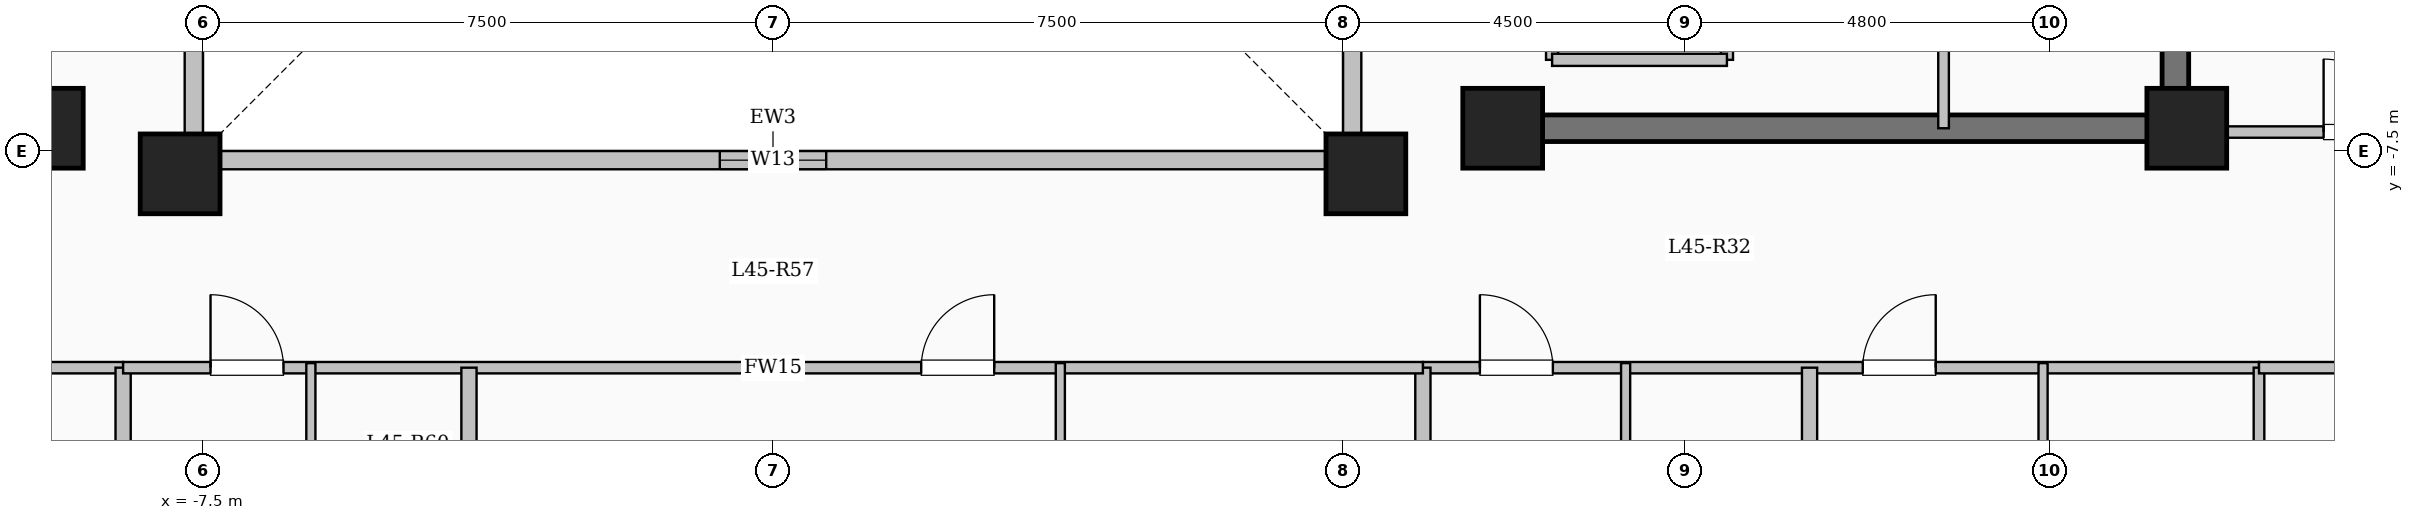
"""IFC4 building model, lengths in metres.
Left out: names, types, materials, properties, quantities, classifications, styles, units other than length and angle.
Written with IfcOpenShell. Run it as: python <this file> out.ifc"""

import sys

from ifc_helpers import new_model, si_unit, direction, frame, frame_2d, origin, origin_2d, place, context, subcontext, project, spatial, rectangle, extrude, element, fill, save


model = new_model("IFC4")
c1 = context("Model", 3, precision=1e-05, world=origin(), true_north=direction((0.0, 1.0)))
c2 = subcontext(c1, "Body", "Model", "MODEL_VIEW")
j1 = project(units=[si_unit("LENGTHUNIT", "METRE"), si_unit("PLANEANGLEUNIT", "RADIAN")], contexts=[c1])
p1 = place(None, origin())
s1 = spatial("IfcSite", under=j1, at=p1, CompositionType="ELEMENT")
p2 = place(p1, origin())
s2 = spatial("IfcBuilding", under=s1, at=p2, CompositionType="ELEMENT")
p3 = place(p2, frame((0.0, 0.0, 166.1)))
s3 = spatial("IfcBuildingStorey", under=s2, at=p3, CompositionType="ELEMENT", Elevation=166.1)
for number, where, z_axis, x_axis in (
    (1, (-7.8, -7.8, 0.0), (0.0, 0.0, 1.0), (1.0, 0.0, 0.0)),
    (2, (7.8, -7.8, 0.0), (0.0, 0.0, 1.0), (1.0, 0.0, 0.0)),
    (3, (-9.6, -7.2, 0.0), (0.0, 0.0, 1.0), (1.0, 0.0, 0.0)),
    (4, (9.6, -7.2, 0.0), (0.0, 0.0, 1.0), (1.0, 0.0, 0.0)),
    (5, (18.6, -7.2, 0.0), (0.0, 0.0, 1.0), (1.0, 0.0, 0.0)),
):
    element("IfcColumn", number, at=place(p3, frame(where, z_axis=z_axis, x_axis=x_axis)), inside=s3, PredefinedType="COLUMN", context=c2, shape_type="SweptSolid", body=[
        extrude(rectangle(XDim=1.05, YDim=1.05, at=origin_2d()), origin(), (0.0, 0.0, 1.0), 3.35),
    ])
p4 = place(p3, frame((-7.62, -7.62, 0.0), z_axis=(0.0, 0.0, 1.0), x_axis=(1.0, 0.0, 0.0)))
e6 = element("IfcWall", 6, at=p4, inside=s3, PredefinedType="SOLIDWALL", context=c2, shape_type="SweptSolid", body=[
    extrude(rectangle(XDim=15.24, YDim=0.24, at=frame_2d((7.62, 0.0))), origin(), (0.0, 0.0, 1.0), 3.1),
])
p5 = place(p4, frame((6.92, 0.0, 0.95)))
e7 = element("IfcOpeningElement", 7, at=p5, cuts=e6, PredefinedType="OPENING", context=c2, shape_type="SweptSolid", body=[
    extrude(rectangle(XDim=1.4, YDim=1.5, at=frame_2d((0.7, 0.75))), frame((0.0, 0.13, 0.0), z_axis=(0.0, -1.0, 0.0), x_axis=(1.0, 0.0, 0.0)), (0.0, 0.0, 1.0), 0.26),
])
p6 = place(p3, frame((7.62, -7.62, 0.0), z_axis=(0.0, 0.0, 1.0), x_axis=(0.0, 1.0, 0.0)))
e8 = element("IfcWall", 8, at=p6, inside=s3, PredefinedType="SOLIDWALL", context=c2, shape_type="SweptSolid", body=[
    extrude(rectangle(XDim=15.24, YDim=0.24, at=frame_2d((7.62, 0.0))), origin(), (0.0, 0.0, 1.0), 3.1),
])
p7 = place(p6, frame((6.92, 0.0, 0.95)))
e9 = element("IfcOpeningElement", 9, at=p7, cuts=e8, PredefinedType="OPENING", context=c2, shape_type="SweptSolid", body=[
    extrude(rectangle(XDim=1.4, YDim=1.5, at=frame_2d((0.7, 0.75))), frame((0.0, 0.13, 0.0), z_axis=(0.0, -1.0, 0.0), x_axis=(1.0, 0.0, 0.0)), (0.0, 0.0, 1.0), 0.26),
])
p8 = place(p3, frame((-7.62, 7.62, 0.0), z_axis=(0.0, 0.0, 1.0), x_axis=(0.0, -1.0, 0.0)))
e10 = element("IfcWall", 10, at=p8, inside=s3, PredefinedType="SOLIDWALL", context=c2, shape_type="SweptSolid", body=[
    extrude(rectangle(XDim=15.24, YDim=0.24, at=frame_2d((7.62, 0.0))), origin(), (0.0, 0.0, 1.0), 3.1),
])
p9 = place(p8, frame((6.92, 0.0, 0.95)))
e11 = element("IfcOpeningElement", 11, at=p9, cuts=e10, PredefinedType="OPENING", context=c2, shape_type="SweptSolid", body=[
    extrude(rectangle(XDim=1.4, YDim=1.5, at=frame_2d((0.7, 0.75))), frame((0.0, 0.13, 0.0), z_axis=(0.0, -1.0, 0.0), x_axis=(1.0, 0.0, 0.0)), (0.0, 0.0, 1.0), 0.26),
])
p10 = place(p3, frame((10.25, -6.3, 0.0), z_axis=(0.0, 0.0, 1.0), x_axis=(0.0, 1.0, 0.0)))
e12 = element("IfcWall", 12, at=p10, inside=s3, PredefinedType="SOLIDWALL", context=c2, shape_type="SweptSolid", body=[
    extrude(rectangle(XDim=2.6, YDim=0.16, at=frame_2d((1.3, 0.0))), origin(), (0.0, 0.0, 1.0), 3.1),
])
p11 = place(p10, frame((0.75, 0.0, 0.0)))
e13 = element("IfcOpeningElement", 13, at=p11, cuts=e12, PredefinedType="OPENING", context=c2, shape_type="SweptSolid", body=[
    extrude(rectangle(XDim=1.1, YDim=2.15, at=frame_2d((0.55, 1.075))), frame((0.0, 0.09, 0.0), z_axis=(0.0, -1.0, 0.0), x_axis=(1.0, 0.0, 0.0)), (0.0, 0.0, 1.0), 0.18),
])
p12 = place(p3, frame((12.55, -6.3, 0.0), z_axis=(0.0, 0.0, 1.0), x_axis=(0.0, 1.0, 0.0)))
e14 = element("IfcWall", 14, at=p12, inside=s3, PredefinedType="SOLIDWALL", context=c2, shape_type="SweptSolid", body=[
    extrude(rectangle(XDim=2.6, YDim=0.16, at=frame_2d((1.3, 0.0))), origin(), (0.0, 0.0, 1.0), 3.1),
])
p13 = place(p3, frame((10.25, -6.3, 0.0), z_axis=(0.0, 0.0, 1.0), x_axis=(1.0, 0.0, 0.0)))
e15 = element("IfcWall", 15, at=p13, inside=s3, PredefinedType="SOLIDWALL", context=c2, shape_type="SweptSolid", body=[
    extrude(rectangle(XDim=2.3, YDim=0.16, at=frame_2d((1.15, 0.0))), origin(), (0.0, 0.0, 1.0), 3.1),
])
p14 = place(p3, frame((18.45, -7.375, 0.0), z_axis=(0.0, 0.0, 1.0), x_axis=(0.0, 1.0, 0.0)))
e16 = element("IfcWall", 16, at=p14, inside=s3, PredefinedType="SHEAR", context=c2, shape_type="SweptSolid", body=[
    extrude(rectangle(XDim=14.05, YDim=0.35, at=frame_2d((7.025, 0.0))), origin(), (0.0, 0.0, 1.0), 3.35),
])
p15 = place(p3, frame((10.075, -7.2, 0.0), z_axis=(0.0, 0.0, 1.0), x_axis=(1.0, 0.0, 0.0)))
e17 = element("IfcWall", 17, at=p15, inside=s3, PredefinedType="SHEAR", context=c2, shape_type="SweptSolid", body=[
    extrude(rectangle(XDim=8.55, YDim=0.35, at=frame_2d((4.275, 0.0))), origin(), (0.0, 0.0, 1.0), 3.35),
])
p16 = place(p3, frame((15.4, -7.2, 0.0), z_axis=(0.0, 0.0, 1.0), x_axis=(0.0, 1.0, 0.0)))
e18 = element("IfcWall", 18, at=p16, inside=s3, PredefinedType="PARTITIONING", context=c2, shape_type="SweptSolid", body=[
    extrude(rectangle(XDim=10.45, YDim=0.14, at=frame_2d((5.225, 0.0))), origin(), (0.0, 0.0, 1.0), 3.1),
])
p17 = place(p16, frame((9.25, 0.0, 0.0)))
e19 = element("IfcOpeningElement", 19, at=p17, cuts=e18, PredefinedType="OPENING", context=c2, shape_type="SweptSolid", body=[
    extrude(rectangle(XDim=0.9, YDim=2.08, at=frame_2d((0.45, 1.04))), frame((0.0, 0.08, 0.0), z_axis=(0.0, -1.0, 0.0), x_axis=(1.0, 0.0, 0.0)), (0.0, 0.0, 1.0), 0.16),
])
p18 = place(p3, frame((-19.55, -10.35, 0.0), z_axis=(0.0, 0.0, 1.0), x_axis=(1.0, 0.0, 0.0)))
e20 = element("IfcWall", 20, at=p18, inside=s3, PredefinedType="PARTITIONING", context=c2, shape_type="SweptSolid", body=[
    extrude(rectangle(XDim=11.0, YDim=0.15, at=frame_2d((5.5, 0.0))), origin(), (0.0, 0.0, 1.0), 3.1),
])
p19 = place(p18, frame((0.7, 0.0, 0.0)))
e21 = element("IfcOpeningElement", 21, at=p19, cuts=e20, PredefinedType="OPENING", context=c2, shape_type="SweptSolid", body=[
    extrude(rectangle(XDim=0.96, YDim=2.15, at=frame_2d((0.48, 1.075))), frame((0.0, 0.085, 0.0), z_axis=(0.0, -1.0, 0.0), x_axis=(1.0, 0.0, 0.0)), (0.0, 0.0, 1.0), 0.17),
])
p20 = place(p18, frame((6.175, 0.0, 0.0)))
e22 = element("IfcOpeningElement", 22, at=p20, cuts=e20, PredefinedType="OPENING", context=c2, shape_type="SweptSolid", body=[
    extrude(rectangle(XDim=0.96, YDim=2.15, at=frame_2d((0.48, 1.075))), frame((0.0, 0.085, 0.0), z_axis=(0.0, -1.0, 0.0), x_axis=(1.0, 0.0, 0.0)), (0.0, 0.0, 1.0), 0.17),
])
p21 = place(p3, frame((8.55, -10.35, 0.0), z_axis=(0.0, 0.0, 1.0), x_axis=(1.0, 0.0, 0.0)))
e23 = element("IfcWall", 23, at=p21, inside=s3, PredefinedType="PARTITIONING", context=c2, shape_type="SweptSolid", body=[
    extrude(rectangle(XDim=11.0, YDim=0.15, at=frame_2d((5.5, 0.0))), origin(), (0.0, 0.0, 1.0), 3.1),
])
p22 = place(p21, frame((0.75, 0.0, 0.0)))
e24 = element("IfcOpeningElement", 24, at=p22, cuts=e23, PredefinedType="OPENING", context=c2, shape_type="SweptSolid", body=[
    extrude(rectangle(XDim=0.96, YDim=2.15, at=frame_2d((0.48, 1.075))), frame((0.0, 0.085, 0.0), z_axis=(0.0, -1.0, 0.0), x_axis=(1.0, 0.0, 0.0)), (0.0, 0.0, 1.0), 0.17),
])
p23 = place(p21, frame((5.787, 0.0, 0.0)))
e25 = element("IfcOpeningElement", 25, at=p23, cuts=e23, PredefinedType="OPENING", context=c2, shape_type="SweptSolid", body=[
    extrude(rectangle(XDim=0.96, YDim=2.15, at=frame_2d((0.48, 1.075))), frame((0.0, 0.085, 0.0), z_axis=(0.0, -1.0, 0.0), x_axis=(1.0, 0.0, 0.0)), (0.0, 0.0, 1.0), 0.17),
])
p24 = place(p3, frame((13.637, -21.2, 0.0), z_axis=(0.0, 0.0, 1.0), x_axis=(0.0, 1.0, 0.0)))
e26 = element("IfcWall", 26, at=p24, inside=s3, PredefinedType="SOLIDWALL", context=c2, shape_type="SweptSolid", body=[
    extrude(rectangle(XDim=10.85, YDim=0.2, at=frame_2d((5.425, 0.0))), origin(), (0.0, 0.0, 1.0), 3.1),
])
p25 = place(p3, frame((11.217, -13.51, 0.0), z_axis=(0.0, 0.0, 1.0), x_axis=(0.0, 1.0, 0.0)))
e27 = element("IfcWall", 27, at=p25, inside=s3, PredefinedType="PARTITIONING", context=c2, shape_type="SweptSolid", body=[
    extrude(rectangle(XDim=3.22, YDim=0.12, at=frame_2d((1.61, 0.0))), origin(), (0.0, 0.0, 1.0), 3.1),
])
p26 = place(p25, frame((1.14, 0.0, 0.0)))
e28 = element("IfcOpeningElement", 28, at=p26, cuts=e27, PredefinedType="OPENING", context=c2, shape_type="SweptSolid", body=[
    extrude(rectangle(XDim=0.88, YDim=2.1, at=frame_2d((0.44, 1.05))), frame((0.0, 0.07, 0.0), z_axis=(0.0, -1.0, 0.0), x_axis=(1.0, 0.0, 0.0)), (0.0, 0.0, 1.0), 0.14),
])
p27 = place(p3, frame((16.709, -13.51, 0.0), z_axis=(0.0, 0.0, 1.0), x_axis=(0.0, 1.0, 0.0)))
e29 = element("IfcWall", 29, at=p27, inside=s3, PredefinedType="PARTITIONING", context=c2, shape_type="SweptSolid", body=[
    extrude(rectangle(XDim=3.22, YDim=0.12, at=frame_2d((1.61, 0.0))), origin(), (0.0, 0.0, 1.0), 3.1),
])
p28 = place(p27, frame((1.14, 0.0, 0.0)))
e30 = element("IfcOpeningElement", 30, at=p28, cuts=e29, PredefinedType="OPENING", context=c2, shape_type="SweptSolid", body=[
    extrude(rectangle(XDim=0.88, YDim=2.1, at=frame_2d((0.44, 1.05))), frame((0.0, 0.07, 0.0), z_axis=(0.0, -1.0, 0.0), x_axis=(1.0, 0.0, 0.0)), (0.0, 0.0, 1.0), 0.14),
])
for number, where, z_axis, x_axis in (
    (31, (-8.55, -21.804, 0.0), (0.0, 0.0, 1.0), (0.0, 1.0, 0.0)),
    (32, (8.55, -21.804, 0.0), (0.0, 0.0, 1.0), (0.0, 1.0, 0.0)),
):
    element("IfcWall", number, at=place(p3, frame(where, z_axis=z_axis, x_axis=x_axis)), inside=s3, PredefinedType="SOLIDWALL", context=c2, shape_type="SweptSolid", body=[
        extrude(rectangle(XDim=11.454, YDim=0.2, at=frame_2d((5.727, 0.0))), origin(), (0.0, 0.0, 1.0), 3.1),
    ])
p29 = place(p3, frame((-8.55, -10.35, 0.0), z_axis=(0.0, 0.0, 1.0), x_axis=(1.0, 0.0, 0.0)))
e33 = element("IfcWall", 33, at=p29, inside=s3, PredefinedType="PARTITIONING", context=c2, shape_type="SweptSolid", body=[
    extrude(rectangle(XDim=17.1, YDim=0.15, at=frame_2d((8.55, 0.0))), origin(), (0.0, 0.0, 1.0), 3.1),
])
p30 = place(p29, frame((1.15, 0.0, 0.0)))
e34 = element("IfcOpeningElement", 34, at=p30, cuts=e33, PredefinedType="OPENING", context=c2, shape_type="SweptSolid", body=[
    extrude(rectangle(XDim=0.96, YDim=2.15, at=frame_2d((0.48, 1.075))), frame((0.0, 0.085, 0.0), z_axis=(0.0, -1.0, 0.0), x_axis=(1.0, 0.0, 0.0)), (0.0, 0.0, 1.0), 0.17),
])
p31 = place(p29, frame((10.5, 0.0, 0.0)))
e35 = element("IfcOpeningElement", 35, at=p31, cuts=e33, PredefinedType="OPENING", context=c2, shape_type="SweptSolid", body=[
    extrude(rectangle(XDim=0.96, YDim=2.15, at=frame_2d((0.48, 1.075))), frame((0.0, 0.085, 0.0), z_axis=(0.0, -1.0, 0.0), x_axis=(1.0, 0.0, 0.0)), (0.0, 0.0, 1.0), 0.17),
])
p32 = place(p3, frame((-4.0, -21.15, 0.0), z_axis=(0.0, 0.0, 1.0), x_axis=(0.0, 1.0, 0.0)))
e36 = element("IfcWall", 36, at=p32, inside=s3, PredefinedType="SOLIDWALL", context=c2, shape_type="SweptSolid", body=[
    extrude(rectangle(XDim=10.8, YDim=0.2, at=frame_2d((5.4, 0.0))), origin(), (0.0, 0.0, 1.0), 3.1),
])
p33 = place(p3, frame((-6.08, -13.51, 0.0), z_axis=(0.0, 0.0, 1.0), x_axis=(0.0, 1.0, 0.0)))
e37 = element("IfcWall", 37, at=p33, inside=s3, PredefinedType="PARTITIONING", context=c2, shape_type="SweptSolid", body=[
    extrude(rectangle(XDim=3.22, YDim=0.12, at=frame_2d((1.61, 0.0))), origin(), (0.0, 0.0, 1.0), 3.1),
])
p34 = place(p33, frame((1.14, 0.0, 0.0)))
e38 = element("IfcOpeningElement", 38, at=p34, cuts=e37, PredefinedType="OPENING", context=c2, shape_type="SweptSolid", body=[
    extrude(rectangle(XDim=0.88, YDim=2.1, at=frame_2d((0.44, 1.05))), frame((0.0, 0.07, 0.0), z_axis=(0.0, -1.0, 0.0), x_axis=(1.0, 0.0, 0.0)), (0.0, 0.0, 1.0), 0.14),
])
p35 = place(p3, frame((3.78, -13.51, 0.0), z_axis=(0.0, 0.0, 1.0), x_axis=(0.0, 1.0, 0.0)))
e39 = element("IfcWall", 39, at=p35, inside=s3, PredefinedType="PARTITIONING", context=c2, shape_type="SweptSolid", body=[
    extrude(rectangle(XDim=3.22, YDim=0.12, at=frame_2d((1.61, 0.0))), origin(), (0.0, 0.0, 1.0), 3.1),
])
p36 = place(p35, frame((1.14, 0.0, 0.0)))
e40 = element("IfcOpeningElement", 40, at=p36, cuts=e39, PredefinedType="OPENING", context=c2, shape_type="SweptSolid", body=[
    extrude(rectangle(XDim=0.88, YDim=2.1, at=frame_2d((0.44, 1.05))), frame((0.0, 0.07, 0.0), z_axis=(0.0, -1.0, 0.0), x_axis=(1.0, 0.0, 0.0)), (0.0, 0.0, 1.0), 0.14),
])
p37 = place(p3, frame((18.45, -7.25, 0.0), z_axis=(0.0, 0.0, 1.0), x_axis=(1.0, 0.0, 0.0)))
e41 = element("IfcWall", 41, at=p37, inside=s3, PredefinedType="PARTITIONING", context=c2, shape_type="SweptSolid", body=[
    extrude(rectangle(XDim=6.63, YDim=0.15, at=frame_2d((3.315, 0.0))), origin(), (0.0, 0.0, 1.0), 3.1),
])
p38 = place(p37, frame((1.95, 0.0, 0.0)))
e42 = element("IfcOpeningElement", 42, at=p38, cuts=e41, PredefinedType="OPENING", context=c2, shape_type="SweptSolid", body=[
    extrude(rectangle(XDim=0.96, YDim=2.15, at=frame_2d((0.48, 1.075))), frame((0.0, 0.085, 0.0), z_axis=(0.0, -1.0, 0.0), x_axis=(1.0, 0.0, 0.0)), (0.0, 0.0, 1.0), 0.17),
])
p39 = place(p3, frame((19.55, -17.25, 0.0), z_axis=(0.0, 0.0, 1.0), x_axis=(0.0, 1.0, 0.0)))
e43 = element("IfcWall", 43, at=p39, inside=s3, PredefinedType="PARTITIONING", context=c2, shape_type="SweptSolid", body=[
    extrude(rectangle(XDim=6.9, YDim=0.14, at=frame_2d((3.45, 0.0))), origin(), (0.0, 0.0, 1.0), 3.1),
])
p40 = place(p3, frame((19.55, -10.35, 0.0), z_axis=(0.0, 0.0, 1.0), x_axis=(1.0, 0.0, 0.0)))
e44 = element("IfcWall", 44, at=p40, inside=s3, PredefinedType="PARTITIONING", context=c2, shape_type="SweptSolid", body=[
    extrude(rectangle(XDim=5.53, YDim=0.15, at=frame_2d((2.765, 0.0))), origin(), (0.0, 0.0, 1.0), 3.1),
])
p41 = place(p40, frame((2.29, 0.0, 0.0)))
e45 = element("IfcOpeningElement", 45, at=p41, cuts=e44, PredefinedType="OPENING", context=c2, shape_type="SweptSolid", body=[
    extrude(rectangle(XDim=0.95, YDim=2.15, at=frame_2d((0.475, 1.075))), frame((0.0, 0.085, 0.0), z_axis=(0.0, -1.0, 0.0), x_axis=(1.0, 0.0, 0.0)), (0.0, 0.0, 1.0), 0.17),
])
p42 = place(p5, origin())
e46 = element("IfcWindow", 46, at=p42, inside=s3, PartitioningType="SINGLE_PANEL", PredefinedType="WINDOW", context=c2, shape_type="SweptSolid", body=[
    extrude(rectangle(XDim=1.4, YDim=1.5, at=frame_2d((0.7, 0.75))), frame((0.0, 0.03, 0.0), z_axis=(0.0, -1.0, 0.0), x_axis=(1.0, 0.0, 0.0)), (0.0, 0.0, 1.0), 0.06),
])
fill(e7, e46)
p43 = place(p22, origin())
e47 = element("IfcDoor", 47, at=p43, inside=s3, OperationType="SINGLE_SWING_LEFT", PredefinedType="DOOR", context=c2, shape_type="SweptSolid", body=[
    extrude(rectangle(XDim=0.96, YDim=2.15, at=frame_2d((0.48, 1.075))), frame((0.0, 0.025, 0.0), z_axis=(0.0, -1.0, 0.0), x_axis=(1.0, 0.0, 0.0)), (0.0, 0.0, 1.0), 0.05),
])
fill(e24, e47)
p44 = place(p23, origin())
e48 = element("IfcDoor", 48, at=p44, inside=s3, OperationType="SINGLE_SWING_RIGHT", PredefinedType="DOOR", context=c2, shape_type="SweptSolid", body=[
    extrude(rectangle(XDim=0.96, YDim=2.15, at=frame_2d((0.48, 1.075))), frame((0.0, 0.025, 0.0), z_axis=(0.0, -1.0, 0.0), x_axis=(1.0, 0.0, 0.0)), (0.0, 0.0, 1.0), 0.05),
])
fill(e25, e48)
p45 = place(p30, origin())
e49 = element("IfcDoor", 49, at=p45, inside=s3, OperationType="SINGLE_SWING_LEFT", PredefinedType="DOOR", context=c2, shape_type="SweptSolid", body=[
    extrude(rectangle(XDim=0.96, YDim=2.15, at=frame_2d((0.48, 1.075))), frame((0.0, 0.025, 0.0), z_axis=(0.0, -1.0, 0.0), x_axis=(1.0, 0.0, 0.0)), (0.0, 0.0, 1.0), 0.05),
])
fill(e34, e49)
p46 = place(p31, origin())
e50 = element("IfcDoor", 50, at=p46, inside=s3, OperationType="SINGLE_SWING_RIGHT", PredefinedType="DOOR", context=c2, shape_type="SweptSolid", body=[
    extrude(rectangle(XDim=0.96, YDim=2.15, at=frame_2d((0.48, 1.075))), frame((0.0, 0.025, 0.0), z_axis=(0.0, -1.0, 0.0), x_axis=(1.0, 0.0, 0.0)), (0.0, 0.0, 1.0), 0.05),
])
fill(e35, e50)
p47 = place(p38, origin())
e51 = element("IfcDoor", 51, at=p47, inside=s3, OperationType="SINGLE_SWING_LEFT", PredefinedType="DOOR", context=c2, shape_type="SweptSolid", body=[
    extrude(rectangle(XDim=0.96, YDim=2.15, at=frame_2d((0.48, 1.075))), frame((0.0, 0.025, 0.0), z_axis=(0.0, -1.0, 0.0), x_axis=(1.0, 0.0, 0.0)), (0.0, 0.0, 1.0), 0.05),
])
fill(e42, e51)
save(model, sys.argv[1])
